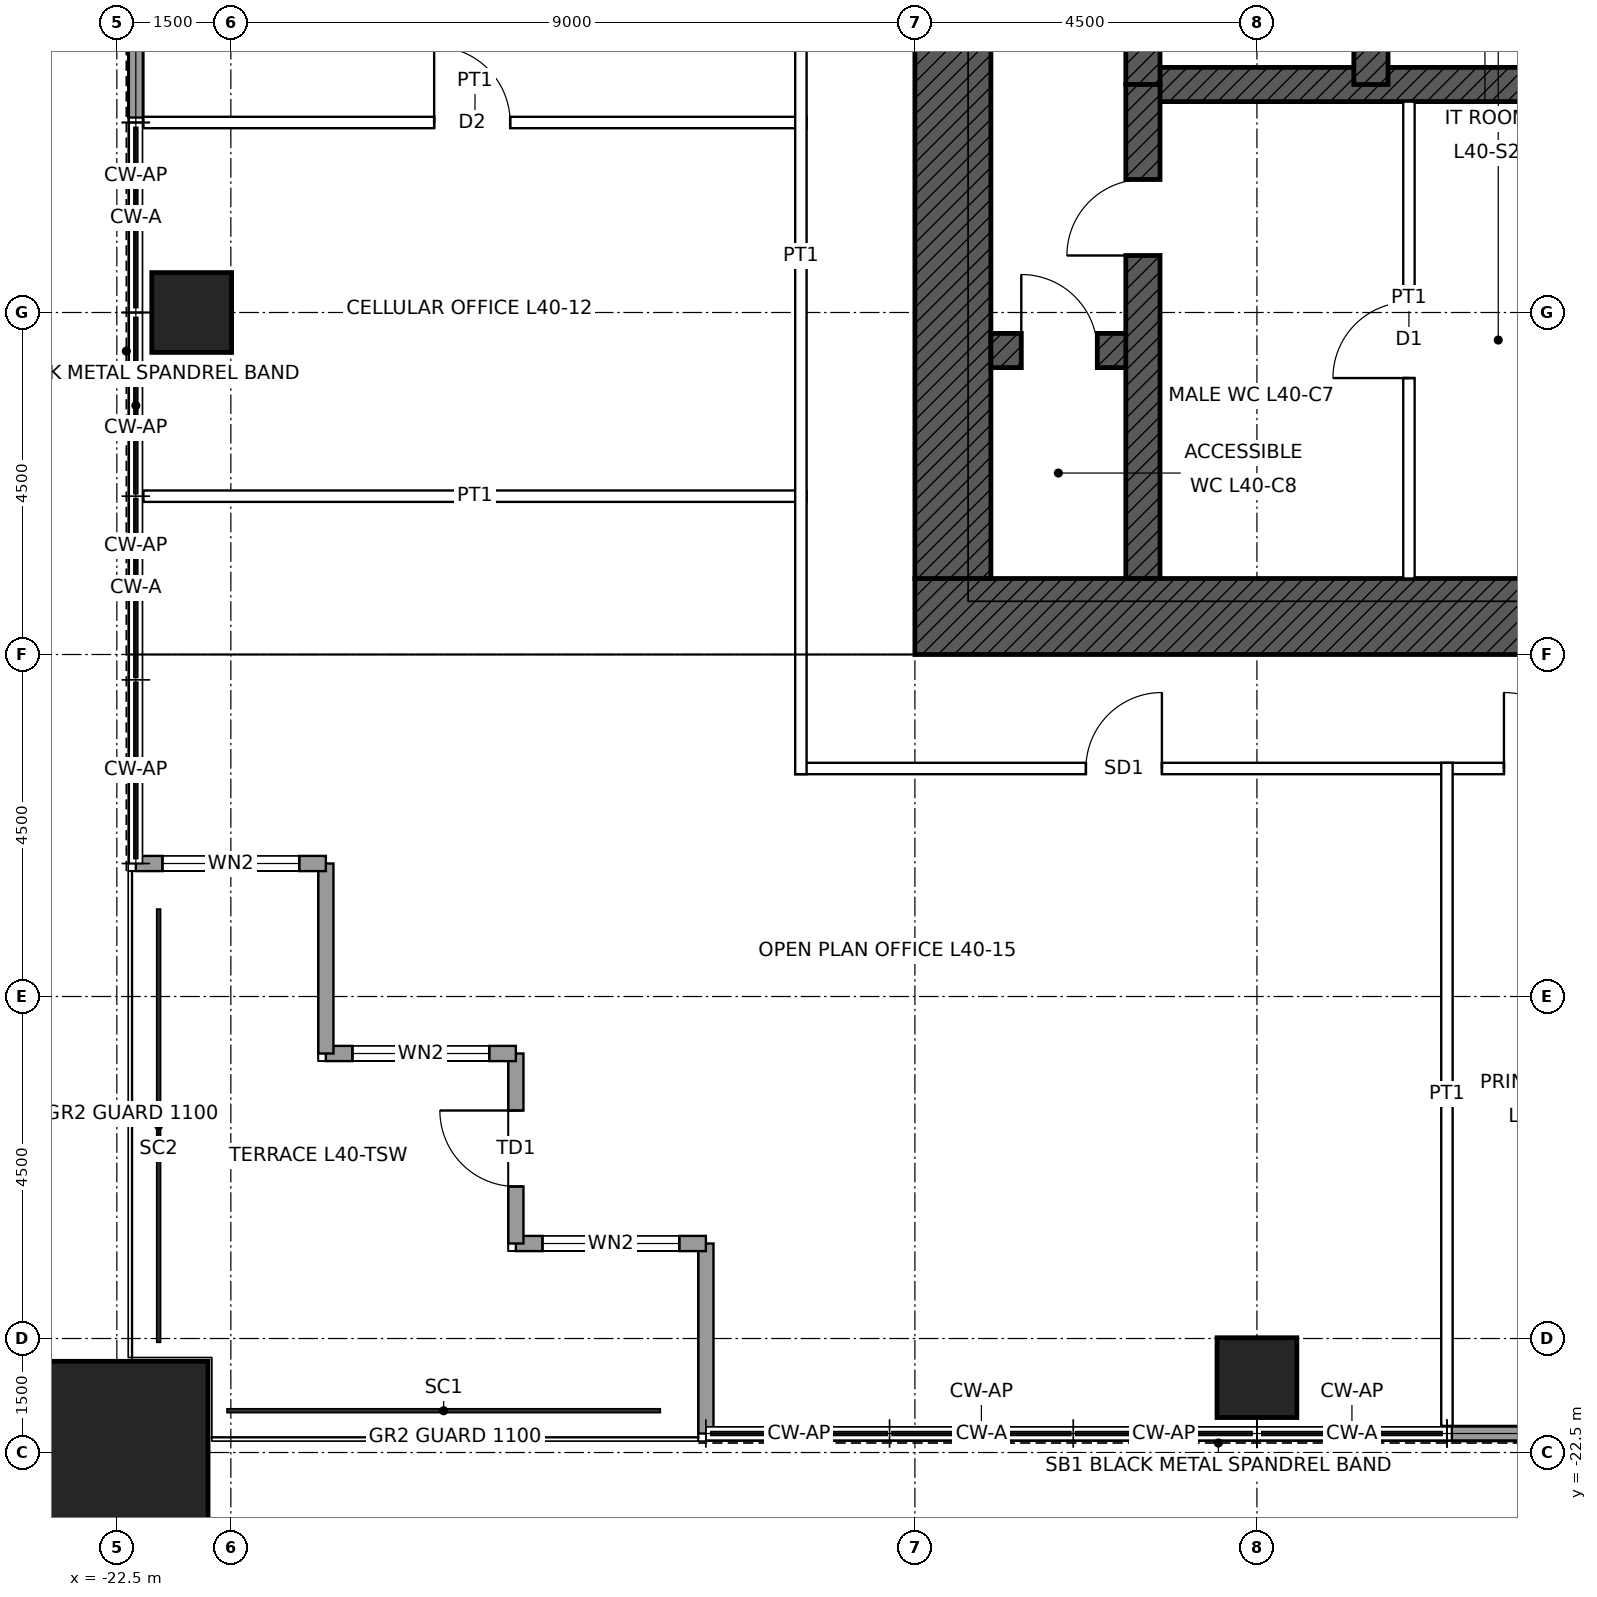
"""IFC4 building model, lengths in metres.
Left out: names, types, materials, properties, quantities, classifications, styles, units other than length and angle.
Written with IfcOpenShell. Run it as: python <this file> out.ifc"""

import sys

from ifc_helpers import new_model, si_unit, direction, frame, frame_2d, origin, origin_2d, place, context, subcontext, project, spatial, rectangle, hollow_rectangle, extrude, element, fill, save


model = new_model("IFC4")
c1 = context("Model", 3, precision=1e-05, world=origin(), true_north=direction((0.0, 1.0)))
c2 = subcontext(c1, "Body", "Model", "MODEL_VIEW")
j1 = project(units=[si_unit("LENGTHUNIT", "METRE"), si_unit("PLANEANGLEUNIT", "RADIAN")], contexts=[c1])
p1 = place(None, origin())
s1 = spatial("IfcSite", under=j1, at=p1, CompositionType="ELEMENT")
p2 = place(p1, origin())
s2 = spatial("IfcBuilding", under=s1, at=p2, CompositionType="ELEMENT")
p3 = place(p2, frame((0.0, 0.0, 193.9)))
s3 = spatial("IfcBuildingStorey", under=s2, at=p3, CompositionType="ELEMENT", Elevation=193.9)
p4 = place(p3, frame((-22.5, -22.5, 0.0), z_axis=(0.0, 0.0, 1.0), x_axis=(1.0, 0.0, 0.0)))
e1 = element("IfcColumn", 1, at=p4, inside=s3, PredefinedType="COLUMN", context=c2, shape_type="SweptSolid", body=[
    extrude(hollow_rectangle(XDim=2.4, YDim=2.4, WallThickness=0.12, at=origin_2d()), origin(), (0.0, 0.0, 1.0), 4.0),
])
for number, where, z_axis, x_axis in (
    (2, (-7.5, -21.515, 0.0), (0.0, 0.0, 1.0), (1.0, 0.0, 0.0)),
    (3, (-21.515, -7.5, 0.0), (0.0, 0.0, 1.0), (1.0, 0.0, 0.0)),
):
    element("IfcColumn", number, at=place(p3, frame(where, z_axis=z_axis, x_axis=x_axis)), inside=s3, PredefinedType="COLUMN", context=c2, shape_type="SweptSolid", body=[
        extrude(hollow_rectangle(XDim=1.05, YDim=1.05, WallThickness=0.07, at=origin_2d()), origin(), (0.0, 0.0, 1.0), 4.0),
    ])
p5 = place(p3, frame((12.0, -11.5, 0.0), z_axis=(0.0, 0.0, 1.0), x_axis=(-1.0, 0.0, 0.0)))
e4 = element("IfcWall", 4, at=p5, inside=s3, PredefinedType="SHEAR", context=c2, shape_type="SweptSolid", body=[
    extrude(rectangle(XDim=24.0, YDim=1.0, at=frame_2d((12.0, 0.0))), origin(), (0.0, 0.0, 1.0), 4.0),
])
p6 = place(p5, frame((11.5, 0.0, 0.0)))
e5 = element("IfcOpeningElement", 5, at=p6, cuts=e4, PredefinedType="OPENING", context=c2, shape_type="SweptSolid", body=[
    extrude(rectangle(XDim=1.0, YDim=2.1, at=frame_2d((0.5, 1.05))), frame((0.0, 0.51, 0.0), z_axis=(0.0, -1.0, 0.0), x_axis=(1.0, 0.0, 0.0)), (0.0, 0.0, 1.0), 1.02),
])
p7 = place(p5, frame((1.0, 0.0, 0.0)))
e6 = element("IfcOpeningElement", 6, at=p7, cuts=e4, PredefinedType="OPENING", context=c2, shape_type="SweptSolid", body=[
    extrude(rectangle(XDim=1.0, YDim=2.4, at=frame_2d((0.5, 1.2))), frame((0.0, 0.51, 0.0), z_axis=(0.0, -1.0, 0.0), x_axis=(1.0, 0.0, 0.0)), (0.0, 0.0, 1.0), 1.02),
])
p8 = place(p3, frame((-11.5, -11.0, 0.0), z_axis=(0.0, 0.0, 1.0), x_axis=(0.0, 1.0, 0.0)))
e7 = element("IfcWall", 7, at=p8, inside=s3, PredefinedType="SHEAR", context=c2, shape_type="SweptSolid", body=[
    extrude(rectangle(XDim=22.0, YDim=1.0, at=frame_2d((11.0, 0.0))), origin(), (0.0, 0.0, 1.0), 4.0),
])
p9 = place(p8, frame((10.5, 0.0, 0.0)))
e8 = element("IfcOpeningElement", 8, at=p9, cuts=e7, PredefinedType="OPENING", context=c2, shape_type="SweptSolid", body=[
    extrude(rectangle(XDim=1.0, YDim=2.4, at=frame_2d((0.5, 1.2))), frame((0.0, 0.51, 0.0), z_axis=(0.0, -1.0, 0.0), x_axis=(1.0, 0.0, 0.0)), (0.0, 0.0, 1.0), 1.02),
])
p10 = place(p3, frame((-9.0, -4.5, 0.0), z_axis=(0.0, 0.0, 1.0), x_axis=(1.0, 0.0, 0.0)))
e9 = element("IfcWall", 9, at=p10, inside=s3, PredefinedType="SHEAR", context=c2, shape_type="SweptSolid", body=[
    extrude(rectangle(XDim=18.0, YDim=0.45, at=frame_2d((9.0, 0.0))), origin(), (0.0, 0.0, 1.0), 4.0),
])
p11 = place(p3, frame((-11.0, -8.0, 0.0), z_axis=(0.0, 0.0, 1.0), x_axis=(1.0, 0.0, 0.0)))
e10 = element("IfcWall", 10, at=p11, inside=s3, PredefinedType="SHEAR", context=c2, shape_type="SweptSolid", body=[
    extrude(rectangle(XDim=2.0, YDim=0.45, at=frame_2d((1.0, 0.0))), origin(), (0.0, 0.0, 1.0), 4.0),
])
p12 = place(p11, frame((0.4, 0.0, 0.0)))
e11 = element("IfcOpeningElement", 11, at=p12, cuts=e10, PredefinedType="OPENING", context=c2, shape_type="SweptSolid", body=[
    extrude(rectangle(XDim=1.0, YDim=2.1, at=frame_2d((0.5, 1.05))), frame((0.0, 0.235, 0.0), z_axis=(0.0, -1.0, 0.0), x_axis=(1.0, 0.0, 0.0)), (0.0, 0.0, 1.0), 0.47),
])
for number, where, z_axis, x_axis in (
    (12, (-9.0, -4.5, 0.0), (0.0, 0.0, 1.0), (0.0, 1.0, 0.0)),
    (13, (-6.0, -4.5, 0.0), (0.0, 0.0, 1.0), (0.0, 1.0, 0.0)),
):
    element("IfcWall", number, at=place(p3, frame(where, z_axis=z_axis, x_axis=x_axis)), inside=s3, PredefinedType="SHEAR", context=c2, shape_type="SweptSolid", body=[
        extrude(rectangle(XDim=3.0, YDim=0.45, at=frame_2d((1.5, 0.0))), origin(), (0.0, 0.0, 1.0), 4.0),
    ])
p13 = place(p3, frame((-9.0, -11.0, 0.0), z_axis=(0.0, 0.0, 1.0), x_axis=(0.0, 1.0, 0.0)))
e14 = element("IfcWall", 14, at=p13, inside=s3, PredefinedType="SHEAR", context=c2, shape_type="SweptSolid", body=[
    extrude(rectangle(XDim=6.5, YDim=0.45, at=frame_2d((3.25, 0.0))), origin(), (0.0, 0.0, 1.0), 4.0),
])
p14 = place(p13, frame((4.25, 0.0, 0.0)))
e15 = element("IfcOpeningElement", 15, at=p14, cuts=e14, PredefinedType="OPENING", context=c2, shape_type="SweptSolid", body=[
    extrude(rectangle(XDim=1.0, YDim=2.1, at=frame_2d((0.5, 1.05))), frame((0.0, 0.235, 0.0), z_axis=(0.0, -1.0, 0.0), x_axis=(1.0, 0.0, 0.0)), (0.0, 0.0, 1.0), 0.47),
])
p15 = place(p3, frame((-14.75, -22.25, 0.0), z_axis=(0.0, 0.0, 1.0), x_axis=(0.0, 1.0, 0.0)))
e16 = element("IfcWall", 16, at=p15, inside=s3, PredefinedType="SOLIDWALL", context=c2, shape_type="SweptSolid", body=[
    extrude(rectangle(XDim=2.5, YDim=0.2, at=frame_2d((1.25, 0.0))), origin(), (0.0, 0.0, 1.0), 3.85),
])
p16 = place(p3, frame((-14.75, -19.75, 0.0), z_axis=(0.0, 0.0, 1.0), x_axis=(-1.0, 0.0, 0.0)))
e17 = element("IfcWall", 17, at=p16, inside=s3, PredefinedType="SOLIDWALL", context=c2, shape_type="SweptSolid", body=[
    extrude(rectangle(XDim=2.5, YDim=0.2, at=frame_2d((1.25, 0.0))), origin(), (0.0, 0.0, 1.0), 3.85),
])
p17 = place(p16, frame((0.35, 0.0, 0.3)))
e18 = element("IfcOpeningElement", 18, at=p17, cuts=e17, PredefinedType="OPENING", context=c2, shape_type="SweptSolid", body=[
    extrude(rectangle(XDim=1.8, YDim=2.4, at=frame_2d((0.9, 1.2))), frame((0.0, 0.11, 0.0), z_axis=(0.0, -1.0, 0.0), x_axis=(1.0, 0.0, 0.0)), (0.0, 0.0, 1.0), 0.22),
])
p18 = place(p3, frame((-17.25, -19.75, 0.0), z_axis=(0.0, 0.0, 1.0), x_axis=(0.0, 1.0, 0.0)))
e19 = element("IfcWall", 19, at=p18, inside=s3, PredefinedType="SOLIDWALL", context=c2, shape_type="SweptSolid", body=[
    extrude(rectangle(XDim=2.5, YDim=0.2, at=frame_2d((1.25, 0.0))), origin(), (0.0, 0.0, 1.0), 3.85),
])
p19 = place(p18, frame((0.75, 0.0, 0.0)))
e20 = element("IfcOpeningElement", 20, at=p19, cuts=e19, PredefinedType="OPENING", context=c2, shape_type="SweptSolid", body=[
    extrude(rectangle(XDim=1.0, YDim=2.4, at=frame_2d((0.5, 1.2))), frame((0.0, 0.11, 0.0), z_axis=(0.0, -1.0, 0.0), x_axis=(1.0, 0.0, 0.0)), (0.0, 0.0, 1.0), 0.22),
])
p20 = place(p3, frame((-17.25, -17.25, 0.0), z_axis=(0.0, 0.0, 1.0), x_axis=(-1.0, 0.0, 0.0)))
e21 = element("IfcWall", 21, at=p20, inside=s3, PredefinedType="SOLIDWALL", context=c2, shape_type="SweptSolid", body=[
    extrude(rectangle(XDim=2.5, YDim=0.2, at=frame_2d((1.25, 0.0))), origin(), (0.0, 0.0, 1.0), 3.85),
])
p21 = place(p20, frame((0.35, 0.0, 0.3)))
e22 = element("IfcOpeningElement", 22, at=p21, cuts=e21, PredefinedType="OPENING", context=c2, shape_type="SweptSolid", body=[
    extrude(rectangle(XDim=1.8, YDim=2.4, at=frame_2d((0.9, 1.2))), frame((0.0, 0.11, 0.0), z_axis=(0.0, -1.0, 0.0), x_axis=(1.0, 0.0, 0.0)), (0.0, 0.0, 1.0), 0.22),
])
p22 = place(p3, frame((-19.75, -17.25, 0.0), z_axis=(0.0, 0.0, 1.0), x_axis=(0.0, 1.0, 0.0)))
e23 = element("IfcWall", 23, at=p22, inside=s3, PredefinedType="SOLIDWALL", context=c2, shape_type="SweptSolid", body=[
    extrude(rectangle(XDim=2.5, YDim=0.2, at=frame_2d((1.25, 0.0))), origin(), (0.0, 0.0, 1.0), 3.85),
])
p23 = place(p3, frame((-19.75, -14.75, 0.0), z_axis=(0.0, 0.0, 1.0), x_axis=(-1.0, 0.0, 0.0)))
e24 = element("IfcWall", 24, at=p23, inside=s3, PredefinedType="SOLIDWALL", context=c2, shape_type="SweptSolid", body=[
    extrude(rectangle(XDim=2.5, YDim=0.2, at=frame_2d((1.25, 0.0))), origin(), (0.0, 0.0, 1.0), 3.85),
])
p24 = place(p23, frame((0.35, 0.0, 0.3)))
e25 = element("IfcOpeningElement", 25, at=p24, cuts=e24, PredefinedType="OPENING", context=c2, shape_type="SweptSolid", body=[
    extrude(rectangle(XDim=1.8, YDim=2.4, at=frame_2d((0.9, 1.2))), frame((0.0, 0.11, 0.0), z_axis=(0.0, -1.0, 0.0), x_axis=(1.0, 0.0, 0.0)), (0.0, 0.0, 1.0), 0.22),
])
for number, where, z_axis, x_axis in (
    (26, (-2.532, -22.25, 0.0), (0.0, 0.0, 1.0), (-1.0, 0.0, 0.0)),
    (27, (-22.25, -4.935, 0.0), (0.0, 0.0, 1.0), (0.0, 1.0, 0.0)),
):
    element("IfcWall", number, at=place(p3, frame(where, z_axis=z_axis, x_axis=x_axis)), inside=s3, PredefinedType="SOLIDWALL", context=c2, shape_type="SweptSolid", body=[
        extrude(rectangle(XDim=2.403, YDim=0.2, at=frame_2d((1.201, 0.0))), origin(), (0.0, 0.0, 1.0), 3.85),
    ])
p25 = place(p3, frame((-13.575, -13.5, 0.0), z_axis=(0.0, 0.0, 1.0), x_axis=(1.0, 0.0, 0.0)))
e28 = element("IfcWall", 28, at=p25, inside=s3, PredefinedType="PARTITIONING", context=c2, shape_type="SweptSolid", body=[
    extrude(rectangle(XDim=27.15, YDim=0.15, at=frame_2d((13.575, 0.0))), origin(), (0.0, 0.0, 1.0), 3.85),
])
p26 = place(p25, frame((19.283, 0.0, 0.0)))
e29 = element("IfcOpeningElement", 29, at=p26, cuts=e28, PredefinedType="OPENING", context=c2, shape_type="SweptSolid", body=[
    extrude(rectangle(XDim=1.0, YDim=2.4, at=frame_2d((0.5, 1.2))), frame((0.0, 0.085, 0.0), z_axis=(0.0, -1.0, 0.0), x_axis=(1.0, 0.0, 0.0)), (0.0, 0.0, 1.0), 0.17),
])
p27 = place(p25, frame((9.325, 0.0, 0.0)))
e30 = element("IfcOpeningElement", 30, at=p27, cuts=e28, PredefinedType="OPENING", context=c2, shape_type="SweptSolid", body=[
    extrude(rectangle(XDim=1.0, YDim=2.1, at=frame_2d((0.5, 1.05))), frame((0.0, 0.085, 0.0), z_axis=(0.0, -1.0, 0.0), x_axis=(1.0, 0.0, 0.0)), (0.0, 0.0, 1.0), 0.17),
])
p28 = place(p25, frame((3.825, 0.0, 0.0)))
e31 = element("IfcOpeningElement", 31, at=p28, cuts=e28, PredefinedType="OPENING", context=c2, shape_type="SweptSolid", body=[
    extrude(rectangle(XDim=1.0, YDim=2.4, at=frame_2d((0.5, 1.2))), frame((0.0, 0.085, 0.0), z_axis=(0.0, -1.0, 0.0), x_axis=(1.0, 0.0, 0.0)), (0.0, 0.0, 1.0), 0.17),
])
p29 = place(p25, frame((25.318, 0.0, 0.0)))
e32 = element("IfcOpeningElement", 32, at=p29, cuts=e28, PredefinedType="OPENING", context=c2, shape_type="SweptSolid", body=[
    extrude(rectangle(XDim=1.0, YDim=2.4, at=frame_2d((0.5, 1.2))), frame((0.0, 0.085, 0.0), z_axis=(0.0, -1.0, 0.0), x_axis=(1.0, 0.0, 0.0)), (0.0, 0.0, 1.0), 0.17),
])
p30 = place(p3, frame((-22.15, -9.917, 0.0), z_axis=(0.0, 0.0, 1.0), x_axis=(1.0, 0.0, 0.0)))
e33 = element("IfcWall", 33, at=p30, inside=s3, PredefinedType="PARTITIONING", context=c2, shape_type="SweptSolid", body=[
    extrude(rectangle(XDim=8.725, YDim=0.15, at=frame_2d((4.362, 0.0))), origin(), (0.0, 0.0, 1.0), 3.85),
])
p31 = place(p3, frame((-22.15, -5.0, 0.0), z_axis=(0.0, 0.0, 1.0), x_axis=(1.0, 0.0, 0.0)))
e34 = element("IfcWall", 34, at=p31, inside=s3, PredefinedType="PARTITIONING", context=c2, shape_type="SweptSolid", body=[
    extrude(rectangle(XDim=8.725, YDim=0.15, at=frame_2d((4.362, 0.0))), origin(), (0.0, 0.0, 1.0), 3.85),
])
p32 = place(p31, frame((3.825, 0.0, 0.0)))
e35 = element("IfcOpeningElement", 35, at=p32, cuts=e34, PredefinedType="OPENING", context=c2, shape_type="SweptSolid", body=[
    extrude(rectangle(XDim=1.0, YDim=2.1, at=frame_2d((0.5, 1.05))), frame((0.0, 0.085, 0.0), z_axis=(0.0, -1.0, 0.0), x_axis=(1.0, 0.0, 0.0)), (0.0, 0.0, 1.0), 0.17),
])
p33 = place(p3, frame((-13.5, -13.575, 0.0), z_axis=(0.0, 0.0, 1.0), x_axis=(0.0, 1.0, 0.0)))
e36 = element("IfcWall", 36, at=p33, inside=s3, PredefinedType="PARTITIONING", context=c2, shape_type="SweptSolid", body=[
    extrude(rectangle(XDim=13.65, YDim=0.15, at=frame_2d((6.825, 0.0))), origin(), (0.0, 0.0, 1.0), 3.85),
])
p34 = place(p3, frame((-5.0, -22.15, 0.0), z_axis=(0.0, 0.0, 1.0), x_axis=(0.0, 1.0, 0.0)))
e37 = element("IfcWall", 37, at=p34, inside=s3, PredefinedType="PARTITIONING", context=c2, shape_type="SweptSolid", body=[
    extrude(rectangle(XDim=8.725, YDim=0.15, at=frame_2d((4.362, 0.0))), origin(), (0.0, 0.0, 1.0), 3.85),
])
p35 = place(p3, frame((-5.5, -11.0, 0.0), z_axis=(0.0, 0.0, 1.0), x_axis=(0.0, 1.0, 0.0)))
e38 = element("IfcWall", 38, at=p35, inside=s3, PredefinedType="PARTITIONING", context=c2, shape_type="SweptSolid", body=[
    extrude(rectangle(XDim=6.275, YDim=0.15, at=frame_2d((3.137, 0.0))), origin(), (0.0, 0.0, 1.0), 3.75),
])
p36 = place(p35, frame((2.637, 0.0, 0.0)))
e39 = element("IfcOpeningElement", 39, at=p36, cuts=e38, PredefinedType="OPENING", context=c2, shape_type="SweptSolid", body=[
    extrude(rectangle(XDim=1.0, YDim=2.1, at=frame_2d((0.5, 1.05))), frame((0.0, 0.085, 0.0), z_axis=(0.0, -1.0, 0.0), x_axis=(1.0, 0.0, 0.0)), (0.0, 0.0, 1.0), 0.17),
])
p37 = place(p17, origin())
e40 = element("IfcWindow", 40, at=p37, inside=s3, PartitioningType="SINGLE_PANEL", PredefinedType="WINDOW", context=c2, shape_type="SweptSolid", body=[
    extrude(rectangle(XDim=1.8, YDim=2.4, at=frame_2d((0.9, 1.2))), frame((0.0, 0.03, 0.0), z_axis=(0.0, -1.0, 0.0), x_axis=(1.0, 0.0, 0.0)), (0.0, 0.0, 1.0), 0.06),
])
fill(e18, e40)
p38 = place(p19, origin())
e41 = element("IfcDoor", 41, at=p38, inside=s3, OperationType="SINGLE_SWING_RIGHT", PredefinedType="DOOR", context=c2, shape_type="SweptSolid", body=[
    extrude(rectangle(XDim=1.0, YDim=2.4, at=frame_2d((0.5, 1.2))), frame((0.0, 0.025, 0.0), z_axis=(0.0, -1.0, 0.0), x_axis=(1.0, 0.0, 0.0)), (0.0, 0.0, 1.0), 0.05),
])
fill(e20, e41)
p39 = place(p21, origin())
e42 = element("IfcWindow", 42, at=p39, inside=s3, PartitioningType="SINGLE_PANEL", PredefinedType="WINDOW", context=c2, shape_type="SweptSolid", body=[
    extrude(rectangle(XDim=1.8, YDim=2.4, at=frame_2d((0.9, 1.2))), frame((0.0, 0.03, 0.0), z_axis=(0.0, -1.0, 0.0), x_axis=(1.0, 0.0, 0.0)), (0.0, 0.0, 1.0), 0.06),
])
fill(e22, e42)
p40 = place(p24, origin())
e43 = element("IfcWindow", 43, at=p40, inside=s3, PartitioningType="SINGLE_PANEL", PredefinedType="WINDOW", context=c2, shape_type="SweptSolid", body=[
    extrude(rectangle(XDim=1.8, YDim=2.4, at=frame_2d((0.9, 1.2))), frame((0.0, 0.03, 0.0), z_axis=(0.0, -1.0, 0.0), x_axis=(1.0, 0.0, 0.0)), (0.0, 0.0, 1.0), 0.06),
])
fill(e25, e43)
p41 = place(p14, origin())
e44 = element("IfcDoor", 44, at=p41, inside=s3, OperationType="SINGLE_SWING_LEFT", PredefinedType="DOOR", context=c2, shape_type="SweptSolid", body=[
    extrude(rectangle(XDim=1.0, YDim=2.1, at=frame_2d((0.5, 1.05))), frame((0.0, 0.025, 0.0), z_axis=(0.0, -1.0, 0.0), x_axis=(1.0, 0.0, 0.0)), (0.0, 0.0, 1.0), 0.05),
])
fill(e15, e44)
p42 = place(p12, origin())
e45 = element("IfcDoor", 45, at=p42, inside=s3, OperationType="SINGLE_SWING_LEFT", PredefinedType="DOOR", context=c2, shape_type="SweptSolid", body=[
    extrude(rectangle(XDim=1.0, YDim=2.1, at=frame_2d((0.5, 1.05))), frame((0.0, 0.025, 0.0), z_axis=(0.0, -1.0, 0.0), x_axis=(1.0, 0.0, 0.0)), (0.0, 0.0, 1.0), 0.05),
])
fill(e11, e45)
p43 = place(p36, origin())
e46 = element("IfcDoor", 46, at=p43, inside=s3, OperationType="SINGLE_SWING_LEFT", PredefinedType="DOOR", context=c2, shape_type="SweptSolid", body=[
    extrude(rectangle(XDim=1.0, YDim=2.1, at=frame_2d((0.5, 1.05))), frame((0.0, 0.025, 0.0), z_axis=(0.0, -1.0, 0.0), x_axis=(1.0, 0.0, 0.0)), (0.0, 0.0, 1.0), 0.05),
])
fill(e39, e46)
p44 = place(p27, origin())
e47 = element("IfcDoor", 47, at=p44, inside=s3, OperationType="SINGLE_SWING_LEFT", PredefinedType="DOOR", context=c2, shape_type="SweptSolid", body=[
    extrude(rectangle(XDim=1.0, YDim=2.1, at=frame_2d((0.5, 1.05))), frame((0.0, 0.025, 0.0), z_axis=(0.0, -1.0, 0.0), x_axis=(1.0, 0.0, 0.0)), (0.0, 0.0, 1.0), 0.05),
])
fill(e30, e47)
p45 = place(p32, origin())
e48 = element("IfcDoor", 48, at=p45, inside=s3, OperationType="SINGLE_SWING_LEFT", PredefinedType="DOOR", context=c2, shape_type="SweptSolid", body=[
    extrude(rectangle(XDim=1.0, YDim=2.1, at=frame_2d((0.5, 1.05))), frame((0.0, 0.025, 0.0), z_axis=(0.0, -1.0, 0.0), x_axis=(1.0, 0.0, 0.0)), (0.0, 0.0, 1.0), 0.05),
])
fill(e35, e48)
p46 = place(p28, origin())
e49 = element("IfcDoor", 49, at=p46, inside=s3, OperationType="SINGLE_SWING_RIGHT", PredefinedType="DOOR", context=c2, shape_type="SweptSolid", body=[
    extrude(rectangle(XDim=1.0, YDim=2.4, at=frame_2d((0.5, 1.2))), frame((0.0, 0.025, 0.0), z_axis=(0.0, -1.0, 0.0), x_axis=(1.0, 0.0, 0.0)), (0.0, 0.0, 1.0), 0.05),
])
fill(e31, e49)
save(model, sys.argv[1])
